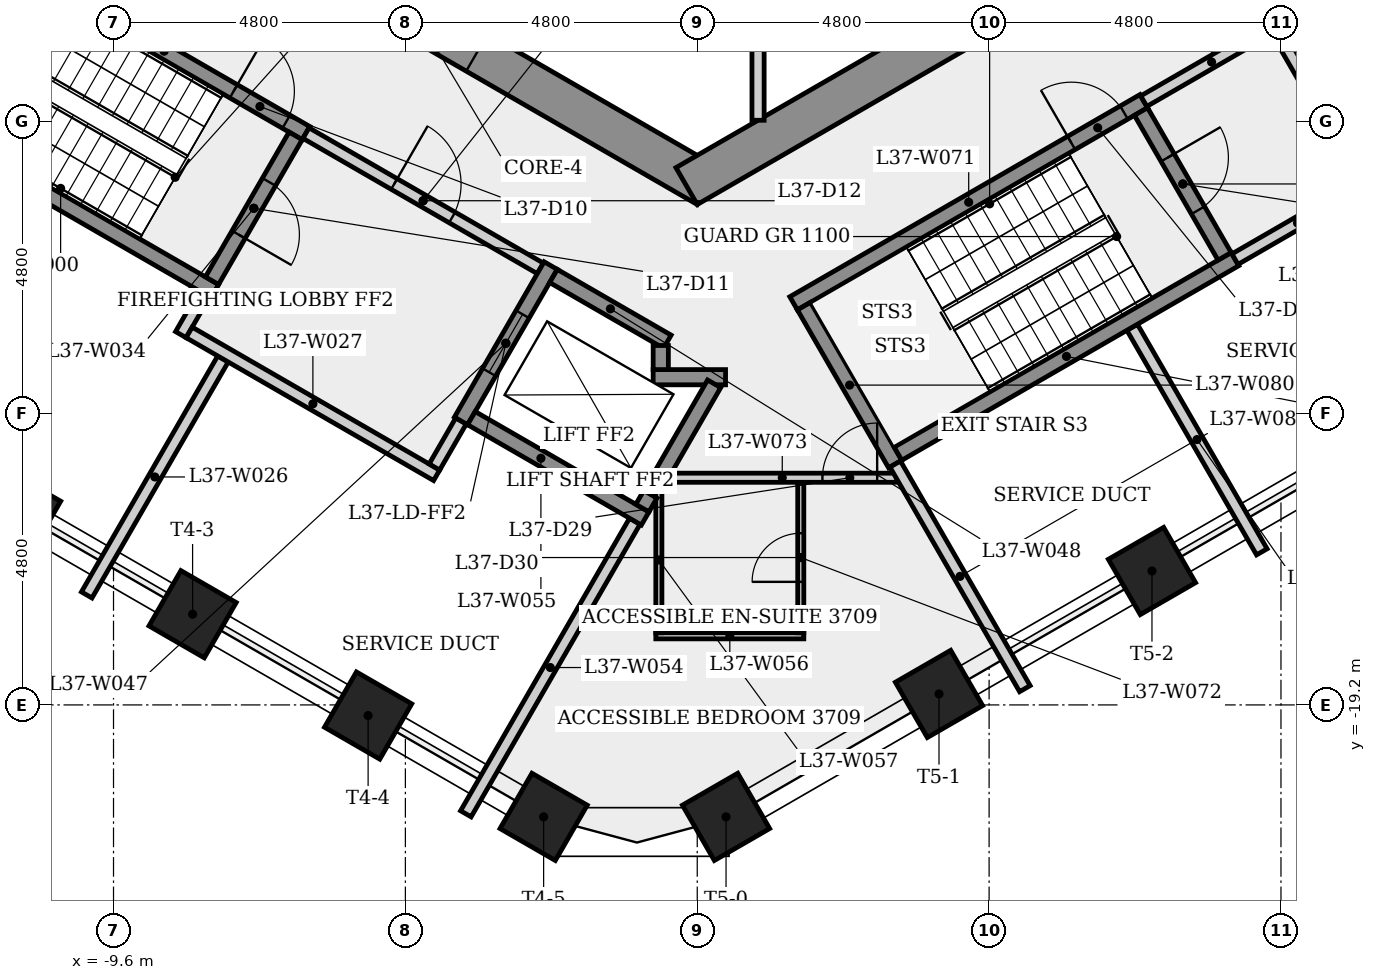
"""IFC4 building model, lengths in metres.
Left out: names, types, materials, properties, quantities, classifications, styles, units other than length and angle.
Written with IfcOpenShell. Run it as: python <this file> out.ifc"""

import sys

from ifc_helpers import new_model, si_unit, direction, frame, frame_2d, origin, origin_2d, place, context, subcontext, project, spatial, rectangle, extrude, element, fill, save


model = new_model("IFC4")
c1 = context("Model", 3, precision=1e-05, world=origin(), true_north=direction((0.0, 1.0)))
c2 = subcontext(c1, "Body", "Model", "MODEL_VIEW")
j1 = project(units=[si_unit("LENGTHUNIT", "METRE"), si_unit("PLANEANGLEUNIT", "RADIAN")], contexts=[c1])
p1 = place(None, origin())
s1 = spatial("IfcSite", under=j1, at=p1, CompositionType="ELEMENT")
p2 = place(p1, origin())
s2 = spatial("IfcBuilding", under=s1, at=p2, CompositionType="ELEMENT")
p3 = place(p2, frame((0.0, 0.0, 139.9)))
s3 = spatial("IfcBuildingStorey", under=s2, at=p3, CompositionType="ELEMENT", Elevation=139.9)
p4 = place(p3, frame((-9.325, -5.182, 0.0), z_axis=(0.0, 0.0, 1.0), x_axis=(0.866023993627, -0.500002442456, 0.0)))
e1 = element("IfcWall", 1, at=p4, inside=s3, PredefinedType="SHEAR", context=c2, shape_type="SweptSolid", body=[
    extrude(rectangle(XDim=10.97, YDim=0.7, at=frame_2d((5.485, 0.0))), origin(), (0.0, 0.0, 1.0), 4.0),
])
p5 = place(p4, frame((5.682, 0.0, 0.0)))
e2 = element("IfcOpeningElement", 2, at=p5, cuts=e1, PredefinedType="OPENING", context=c2, shape_type="SweptSolid", body=[
    extrude(rectangle(XDim=0.9, YDim=2.1, at=frame_2d((0.45, 1.05))), frame((0.0, 0.36, 0.0), z_axis=(0.0, -1.0, 0.0), x_axis=(1.0, 0.0, 0.0)), (0.0, 0.0, 1.0), 0.72),
])
p6 = place(p3, frame((-0.175, -10.667, 0.0), z_axis=(0.0, 0.0, 1.0), x_axis=(0.866023993627, 0.500002442456, 0.0)))
e3 = element("IfcWall", 3, at=p6, inside=s3, PredefinedType="SHEAR", context=c2, shape_type="SweptSolid", body=[
    extrude(rectangle(XDim=10.97, YDim=0.7, at=frame_2d((5.485, 0.0))), origin(), (0.0, 0.0, 1.0), 4.0),
])
p7 = place(p6, frame((7.252, 0.0, 0.0)))
e4 = element("IfcOpeningElement", 4, at=p7, cuts=e3, PredefinedType="OPENING", context=c2, shape_type="SweptSolid", body=[
    extrude(rectangle(XDim=0.9, YDim=2.1, at=frame_2d((0.45, 1.05))), frame((0.0, 0.36, 0.0), z_axis=(0.0, -1.0, 0.0), x_axis=(1.0, 0.0, 0.0)), (0.0, 0.0, 1.0), 0.72),
])
for number, where, z_axis, x_axis in (
    (5, (-11.186, -16.042, 0.0), (0.0, 0.0, 1.0), (-0.5, -0.866, 0.0)),
    (6, (-8.3, -17.708, 0.0), (0.0, 0.0, 1.0), (-0.5, -0.866, 0.0)),
    (7, (-5.413, -19.375, 0.0), (0.0, 0.0, 1.0), (-0.5, -0.866, 0.0)),
    (8, (-2.526, -21.042, 0.0), (0.0, 0.0, 1.0), (-0.5, -0.866, 0.0)),
    (9, (0.474, -21.042, 0.0), (0.0, 0.0, 1.0), (0.5, -0.866, 0.0)),
    (10, (3.976, -19.019, 0.0), (0.0, 0.0, 1.0), (0.5, -0.866, 0.0)),
    (11, (7.479, -16.997, 0.0), (0.0, 0.0, 1.0), (0.5, -0.866, 0.0)),
):
    element("IfcColumn", number, at=place(p3, frame(where, z_axis=z_axis, x_axis=x_axis)), inside=s3, PredefinedType="COLUMN", context=c2, shape_type="SweptSolid", body=[
        extrude(rectangle(XDim=1.05, YDim=1.05, at=origin_2d()), origin(), (0.0, 0.0, 1.0), 4.0),
    ])
p8 = place(p3, frame((-11.1, -7.101, 0.0), z_axis=(0.0, 0.0, 1.0), x_axis=(0.866028615007, -0.499994437958, 0.0)))
e12 = element("IfcWall", 12, at=p8, inside=s3, PredefinedType="SHEAR", context=c2, shape_type="SweptSolid", body=[
    extrude(rectangle(XDim=5.387, YDim=0.25, at=frame_2d((2.694, 0.0))), origin(), (0.0, 0.0, 1.0), 3.6),
])
p9 = place(p8, frame((4.012, 0.0, 0.0)))
e13 = element("IfcOpeningElement", 13, at=p9, cuts=e12, PredefinedType="OPENING", context=c2, shape_type="SweptSolid", body=[
    extrude(rectangle(XDim=1.0, YDim=2.1, at=frame_2d((0.5, 1.05))), frame((0.0, 0.135, 0.0), z_axis=(0.0, -1.0, 0.0), x_axis=(1.0, 0.0, 0.0)), (0.0, 0.0, 1.0), 0.27),
])
p10 = place(p3, frame((-8.493, -13.11, 0.0), z_axis=(0.0, 0.0, 1.0), x_axis=(0.500067724834, 0.865986299303, 0.0)))
e14 = element("IfcWall", 14, at=p10, inside=s3, PredefinedType="PLUMBINGWALL", context=c2, shape_type="SweptSolid", body=[
    extrude(rectangle(XDim=0.775, YDim=0.2, at=frame_2d((0.388, 0.0))), origin(), (0.0, 0.0, 1.0), 3.6),
])
p11 = place(p3, frame((-7.935, -12.393, 0.0), z_axis=(0.0, 0.0, 1.0), x_axis=(-0.866025499775, 0.499999833739, 0.0)))
e15 = element("IfcWall", 15, at=p11, inside=s3, PredefinedType="SHEAR", context=c2, shape_type="SweptSolid", body=[
    extrude(rectangle(XDim=6.4, YDim=0.25, at=frame_2d((3.2, 0.0))), origin(), (0.0, 0.0, 1.0), 3.6),
])
p12 = place(p3, frame((-7.8, -13.51, 0.0), z_axis=(0.0, 0.0, 1.0), x_axis=(-0.499994393058, -0.866028640929, 0.0)))
e16 = element("IfcWall", 16, at=p12, inside=s3, PredefinedType="PLUMBINGWALL", context=c2, shape_type="SweptSolid", body=[
    extrude(rectangle(XDim=4.481, YDim=0.2, at=frame_2d((2.241, 0.0))), origin(), (0.0, 0.0, 1.0), 3.6),
])
p13 = place(p3, frame((-8.356, -13.073, 0.0), z_axis=(0.0, 0.0, 1.0), x_axis=(0.866038532462, -0.499977259774, 0.0)))
e17 = element("IfcWall", 17, at=p13, inside=s3, PredefinedType="PLUMBINGWALL", context=c2, shape_type="SweptSolid", body=[
    extrude(rectangle(XDim=4.7, YDim=0.2, at=frame_2d((2.35, 0.0))), origin(), (0.0, 0.0, 1.0), 3.6),
])
p14 = place(p3, frame((-6.605, -9.841, 0.0), z_axis=(0.0, 0.0, 1.0), x_axis=(-0.499996545922, -0.866027397988, 0.0)))
e18 = element("IfcWall", 18, at=p14, inside=s3, PredefinedType="SHEAR", context=c2, shape_type="SweptSolid", body=[
    extrude(rectangle(XDim=2.75, YDim=0.25, at=frame_2d((1.375, 0.0))), origin(), (0.0, 0.0, 1.0), 3.6),
])
p15 = place(p14, frame((0.875, 0.0, 0.0)))
e19 = element("IfcOpeningElement", 19, at=p15, cuts=e18, PredefinedType="OPENING", context=c2, shape_type="SweptSolid", body=[
    extrude(rectangle(XDim=1.0, YDim=2.1, at=frame_2d((0.5, 1.05))), frame((0.0, 0.135, 0.0), z_axis=(0.0, -1.0, 0.0), x_axis=(1.0, 0.0, 0.0)), (0.0, 0.0, 1.0), 0.27),
])
p16 = place(p3, frame((-6.435, -9.795, 0.0), z_axis=(0.0, 0.0, 1.0), x_axis=(0.866012907634, -0.500021643343, 0.0)))
e20 = element("IfcWall", 20, at=p16, inside=s3, PredefinedType="PARTITIONING", context=c2, shape_type="SweptSolid", body=[
    extrude(rectangle(XDim=4.45, YDim=0.2, at=frame_2d((2.225, 0.0))), origin(), (0.0, 0.0, 1.0), 3.6),
])
p17 = place(p16, frame((1.675, 0.0, 0.0)))
e21 = element("IfcOpeningElement", 21, at=p17, cuts=e20, PredefinedType="OPENING", context=c2, shape_type="SweptSolid", body=[
    extrude(rectangle(XDim=1.1, YDim=2.1, at=frame_2d((0.55, 1.05))), frame((0.0, 0.11, 0.0), z_axis=(0.0, -1.0, 0.0), x_axis=(1.0, 0.0, 0.0)), (0.0, 0.0, 1.0), 0.22),
])
p18 = place(p3, frame((-3.885, -14.529, 0.0), z_axis=(0.0, 0.0, 1.0), x_axis=(-0.499859285417, -0.866106630146, 0.0)))
e22 = element("IfcWall", 22, at=p18, inside=s3, PredefinedType="PLUMBINGWALL", context=c2, shape_type="SweptSolid", body=[
    extrude(rectangle(XDim=0.875, YDim=0.2, at=frame_2d((0.438, 0.0))), origin(), (0.0, 0.0, 1.0), 3.6),
])
p19 = place(p3, frame((-2.41, -11.974, 0.0), z_axis=(0.0, 0.0, 1.0), x_axis=(-0.500001826776, -0.866024349092, 0.0)))
e23 = element("IfcWall", 23, at=p19, inside=s3, PredefinedType="SHEAR", context=c2, shape_type="SweptSolid", body=[
    extrude(rectangle(XDim=2.95, YDim=0.25, at=frame_2d((1.475, 0.0))), origin(), (0.0, 0.0, 1.0), 3.6),
])
p20 = place(p19, frame((0.925, 0.0, 0.0)))
e24 = element("IfcOpeningElement", 24, at=p20, cuts=e23, PredefinedType="OPENING", context=c2, shape_type="SweptSolid", body=[
    extrude(rectangle(XDim=1.1, YDim=2.1, at=frame_2d((0.55, 1.05))), frame((0.0, 0.135, 0.0), z_axis=(0.0, -1.0, 0.0), x_axis=(1.0, 0.0, 0.0)), (0.0, 0.0, 1.0), 0.27),
])
p21 = place(p3, frame((-2.364, -12.145, 0.0), z_axis=(0.0, 0.0, 1.0), x_axis=(0.86603892542, -0.499976579108, 0.0)))
e25 = element("IfcWall", 25, at=p21, inside=s3, PredefinedType="SHEAR", context=c2, shape_type="SweptSolid", body=[
    extrude(rectangle(XDim=2.162, YDim=0.25, at=frame_2d((1.081, 0.0))), origin(), (0.0, 0.0, 1.0), 3.6),
])
p22 = place(p3, frame((-1.027, -16.179, 0.0), z_axis=(0.0, 0.0, 1.0), x_axis=(-0.499995019066, -0.866028279509, 0.0)))
e26 = element("IfcWall", 26, at=p22, inside=s3, PredefinedType="PLUMBINGWALL", context=c2, shape_type="SweptSolid", body=[
    extrude(rectangle(XDim=5.557, YDim=0.2, at=frame_2d((2.778, 0.0))), origin(), (0.0, 0.0, 1.0), 3.6),
])
p23 = place(p3, frame((-0.856, -16.133, 0.0), z_axis=(0.0, 0.0, 1.0), x_axis=(-0.866021716278, 0.500006386895, 0.0)))
e27 = element("IfcWall", 27, at=p23, inside=s3, PredefinedType="SHEAR", context=c2, shape_type="SweptSolid", body=[
    extrude(rectangle(XDim=3.3, YDim=0.25, at=frame_2d((1.65, 0.0))), origin(), (0.0, 0.0, 1.0), 3.6),
])
p24 = place(p3, frame((-0.681, -18.063, 0.0), z_axis=(0.0, 0.0, 1.0), x_axis=(1.0, 0.0, 0.0)))
e28 = element("IfcWall", 28, at=p24, inside=s3, PredefinedType="PARTITIONING", context=c2, shape_type="SweptSolid", body=[
    extrude(rectangle(XDim=2.434, YDim=0.1, at=frame_2d((1.217, 0.0))), origin(), (0.0, 0.0, 1.0), 3.6),
])
p25 = place(p3, frame((-0.631, -15.618, 0.0), z_axis=(0.0, 0.0, 1.0), x_axis=(0.0, -1.0, 0.0)))
e29 = element("IfcWall", 29, at=p25, inside=s3, PredefinedType="PARTITIONING", context=c2, shape_type="SweptSolid", body=[
    extrude(rectangle(XDim=2.395, YDim=0.1, at=frame_2d((1.198, 0.0))), origin(), (0.0, 0.0, 1.0), 3.6),
])
p26 = place(p3, frame((-0.771, -15.736, 0.0), z_axis=(0.0, 0.0, 1.0), x_axis=(-0.500153222552, -0.865936922628, 0.0)))
e30 = element("IfcWall", 30, at=p26, inside=s3, PredefinedType="SHEAR", context=c2, shape_type="SweptSolid", body=[
    extrude(rectangle(XDim=0.262, YDim=0.25, at=frame_2d((0.131, 0.0))), origin(), (0.0, 0.0, 1.0), 4.0),
])
p27 = place(p3, frame((-0.725, -13.81, 0.0), z_axis=(0.0, 0.0, 1.0), x_axis=(1.0, 0.0, 0.0)))
e31 = element("IfcWall", 31, at=p27, inside=s3, PredefinedType="SHEAR", context=c2, shape_type="SweptSolid", body=[
    extrude(rectangle(XDim=1.191, YDim=0.25, at=frame_2d((0.595, 0.0))), origin(), (0.0, 0.0, 1.0), 3.6),
])
p28 = place(p3, frame((-0.6, -13.289, 0.0), z_axis=(0.0, 0.0, 1.0), x_axis=(0.0, -1.0, 0.0)))
e32 = element("IfcWall", 32, at=p28, inside=s3, PredefinedType="SHEAR", context=c2, shape_type="SweptSolid", body=[
    extrude(rectangle(XDim=0.396, YDim=0.25, at=frame_2d((0.198, 0.0))), origin(), (0.0, 0.0, 1.0), 4.0),
])
p29 = place(p3, frame((0.278, -13.918, 0.0), z_axis=(0.0, 0.0, 1.0), x_axis=(-0.499980071345, -0.866036909293, 0.0)))
e33 = element("IfcWall", 33, at=p29, inside=s3, PredefinedType="SHEAR", context=c2, shape_type="SweptSolid", body=[
    extrude(rectangle(XDim=1.859, YDim=0.25, at=frame_2d((0.93, 0.0))), origin(), (0.0, 0.0, 1.0), 4.0),
])
p30 = place(p3, frame((1.0, -5.275, 0.0), z_axis=(0.0, 0.0, 1.0), x_axis=(0.0, -1.0, 0.0)))
e34 = element("IfcWall", 34, at=p30, inside=s3, PredefinedType="PARTITIONING", context=c2, shape_type="SweptSolid", body=[
    extrude(rectangle(XDim=4.309, YDim=0.2, at=frame_2d((2.155, 0.0))), origin(), (0.0, 0.0, 1.0), 3.6),
])
p31 = place(p3, frame((1.585, -12.595, 0.0), z_axis=(0.0, 0.0, 1.0), x_axis=(0.866036417653, 0.499980922934, 0.0)))
e35 = element("IfcWall", 35, at=p31, inside=s3, PredefinedType="SHEAR", context=c2, shape_type="SweptSolid", body=[
    extrude(rectangle(XDim=6.65, YDim=0.25, at=frame_2d((3.325, 0.0))), origin(), (0.0, 0.0, 1.0), 3.6),
])
p32 = place(p31, frame((5.275, 0.0, 0.0)))
e36 = element("IfcOpeningElement", 36, at=p32, cuts=e35, PredefinedType="OPENING", context=c2, shape_type="SweptSolid", body=[
    extrude(rectangle(XDim=1.0, YDim=2.1, at=frame_2d((0.5, 1.05))), frame((0.0, 0.135, 0.0), z_axis=(0.0, -1.0, 0.0), x_axis=(1.0, 0.0, 0.0)), (0.0, 0.0, 1.0), 0.27),
])
p33 = place(p3, frame((1.703, -18.013, 0.0), z_axis=(0.0, 0.0, 1.0), x_axis=(0.0, 1.0, 0.0)))
e37 = element("IfcWall", 37, at=p33, inside=s3, PredefinedType="PARTITIONING", context=c2, shape_type="SweptSolid", body=[
    extrude(rectangle(XDim=2.475, YDim=0.1, at=frame_2d((1.237, 0.0))), origin(), (0.0, 0.0, 1.0), 3.6),
])
p34 = place(p33, frame((0.837, 0.0, 0.0)))
e38 = element("IfcOpeningElement", 38, at=p34, cuts=e37, PredefinedType="OPENING", context=c2, shape_type="SweptSolid", body=[
    extrude(rectangle(XDim=0.8, YDim=2.1, at=frame_2d((0.4, 1.05))), frame((0.0, 0.06, 0.0), z_axis=(0.0, -1.0, 0.0), x_axis=(1.0, 0.0, 0.0)), (0.0, 0.0, 1.0), 0.12),
])
p35 = place(p3, frame((-0.489, -15.463, 0.0), z_axis=(0.0, 0.0, 1.0), x_axis=(1.0, 0.0, 0.0)))
e39 = element("IfcWall", 39, at=p35, inside=s3, PredefinedType="PARTITIONING", context=c2, shape_type="SweptSolid", body=[
    extrude(rectangle(XDim=3.774, YDim=0.15, at=frame_2d((1.887, 0.0))), origin(), (0.0, 0.0, 1.0), 3.6),
])
p36 = place(p35, frame((2.548, 0.0, 0.0)))
e40 = element("IfcOpeningElement", 40, at=p36, cuts=e39, PredefinedType="OPENING", context=c2, shape_type="SweptSolid", body=[
    extrude(rectangle(XDim=0.9, YDim=2.1, at=frame_2d((0.45, 1.05))), frame((0.0, 0.085, 0.0), z_axis=(0.0, -1.0, 0.0), x_axis=(1.0, 0.0, 0.0)), (0.0, 0.0, 1.0), 0.17),
])
p37 = place(p3, frame((3.256, -15.239, 0.0), z_axis=(0.0, 0.0, 1.0), x_axis=(-0.50002537861, 0.866010750942, 0.0)))
e41 = element("IfcWall", 41, at=p37, inside=s3, PredefinedType="SHEAR", context=c2, shape_type="SweptSolid", body=[
    extrude(rectangle(XDim=3.0, YDim=0.25, at=frame_2d((1.5, 0.0))), origin(), (0.0, 0.0, 1.0), 3.6),
])
p38 = place(p3, frame((3.256, -15.239, 0.0), z_axis=(0.0, 0.0, 1.0), x_axis=(0.499986710104, -0.866033076574, 0.0)))
e42 = element("IfcWall", 42, at=p38, inside=s3, PredefinedType="PLUMBINGWALL", context=c2, shape_type="SweptSolid", body=[
    extrude(rectangle(XDim=4.265, YDim=0.2, at=frame_2d((2.133, 0.0))), origin(), (0.0, 0.0, 1.0), 3.6),
])
p39 = place(p3, frame((7.153, -12.989, 0.0), z_axis=(0.0, 0.0, 1.0), x_axis=(0.500029638619, -0.866008291244, 0.0)))
e43 = element("IfcWall", 43, at=p39, inside=s3, PredefinedType="PLUMBINGWALL", context=c2, shape_type="SweptSolid", body=[
    extrude(rectangle(XDim=4.265, YDim=0.2, at=frame_2d((2.133, 0.0))), origin(), (0.0, 0.0, 1.0), 3.6),
])
p40 = place(p3, frame((3.301, -15.068, 0.0), z_axis=(0.0, 0.0, 1.0), x_axis=(0.866035036182, 0.499983315828, 0.0)))
e44 = element("IfcWall", 44, at=p40, inside=s3, PredefinedType="SHEAR", context=c2, shape_type="SweptSolid", body=[
    extrude(rectangle(XDim=6.4, YDim=0.25, at=frame_2d((3.2, 0.0))), origin(), (0.0, 0.0, 1.0), 4.0),
])
p41 = place(p3, frame((7.298, -9.441, 0.0), z_axis=(0.0, 0.0, 1.0), x_axis=(0.500034990121, -0.866005201286, 0.0)))
e45 = element("IfcWall", 45, at=p41, inside=s3, PredefinedType="SHEAR", context=c2, shape_type="SweptSolid", body=[
    extrude(rectangle(XDim=2.75, YDim=0.25, at=frame_2d((1.375, 0.0))), origin(), (0.0, 0.0, 1.0), 3.6),
])
p42 = place(p41, frame((0.875, 0.0, 0.0)))
e46 = element("IfcOpeningElement", 46, at=p42, cuts=e45, PredefinedType="OPENING", context=c2, shape_type="SweptSolid", body=[
    extrude(rectangle(XDim=1.0, YDim=2.1, at=frame_2d((0.5, 1.05))), frame((0.0, 0.135, 0.0), z_axis=(0.0, -1.0, 0.0), x_axis=(1.0, 0.0, 0.0)), (0.0, 0.0, 1.0), 0.27),
])
p43 = place(p3, frame((7.344, -9.27, 0.0), z_axis=(0.0, 0.0, 1.0), x_axis=(0.866005588531, 0.500034319456, 0.0)))
e47 = element("IfcWall", 47, at=p43, inside=s3, PredefinedType="PARTITIONING", context=c2, shape_type="SweptSolid", body=[
    extrude(rectangle(XDim=2.575, YDim=0.2, at=frame_2d((1.288, 0.0))), origin(), (0.0, 0.0, 1.0), 3.6),
])
p44 = place(p3, frame((9.537, -8.119, 0.0), z_axis=(0.0, 0.0, 1.0), x_axis=(0.499990139034, -0.866031096941, 0.0)))
e48 = element("IfcWall", 48, at=p44, inside=s3, PredefinedType="PARTITIONING", context=c2, shape_type="SweptSolid", body=[
    extrude(rectangle(XDim=3.0, YDim=0.2, at=frame_2d((1.5, 0.0))), origin(), (0.0, 0.0, 1.0), 3.6),
])
p45 = place(p44, frame((0.935, 0.0, 0.0)))
e49 = element("IfcOpeningElement", 49, at=p45, cuts=e48, PredefinedType="OPENING", context=c2, shape_type="SweptSolid", body=[
    extrude(rectangle(XDim=1.0, YDim=2.1, at=frame_2d((0.5, 1.05))), frame((0.0, 0.11, 0.0), z_axis=(0.0, -1.0, 0.0), x_axis=(1.0, 0.0, 0.0)), (0.0, 0.0, 1.0), 0.22),
])
p46 = place(p3, frame((10.901, -10.681, 0.0), z_axis=(0.0, 0.0, 1.0), x_axis=(-0.866007538022, -0.500030943131, 0.0)))
e50 = element("IfcWall", 50, at=p46, inside=s3, PredefinedType="PLUMBINGWALL", context=c2, shape_type="SweptSolid", body=[
    extrude(rectangle(XDim=2.375, YDim=0.2, at=frame_2d((1.188, 0.0))), origin(), (0.0, 0.0, 1.0), 3.6),
])
p47 = place(p9, origin())
e51 = element("IfcDoor", 51, at=p47, inside=s3, OperationType="SINGLE_SWING_LEFT", PredefinedType="DOOR", context=c2, shape_type="SweptSolid", body=[
    extrude(rectangle(XDim=1.0, YDim=2.1, at=frame_2d((0.5, 1.05))), frame((0.0, 0.025, 0.0), z_axis=(0.0, -1.0, 0.0), x_axis=(1.0, 0.0, 0.0)), (0.0, 0.0, 1.0), 0.05),
])
fill(e13, e51)
p48 = place(p15, origin())
e52 = element("IfcDoor", 52, at=p48, inside=s3, OperationType="SINGLE_SWING_RIGHT", PredefinedType="DOOR", context=c2, shape_type="SweptSolid", body=[
    extrude(rectangle(XDim=1.0, YDim=2.1, at=frame_2d((0.5, 1.05))), frame((0.0, 0.025, 0.0), z_axis=(0.0, -1.0, 0.0), x_axis=(1.0, 0.0, 0.0)), (0.0, 0.0, 1.0), 0.05),
])
fill(e19, e52)
p49 = place(p17, origin())
e53 = element("IfcDoor", 53, at=p49, inside=s3, OperationType="SINGLE_SWING_LEFT", PredefinedType="DOOR", context=c2, shape_type="SweptSolid", body=[
    extrude(rectangle(XDim=1.1, YDim=2.1, at=frame_2d((0.55, 1.05))), frame((0.0, 0.025, 0.0), z_axis=(0.0, -1.0, 0.0), x_axis=(1.0, 0.0, 0.0)), (0.0, 0.0, 1.0), 0.05),
])
fill(e21, e53)
p50 = place(p20, origin())
e54 = element("IfcDoor", 54, at=p50, inside=s3, OperationType="SLIDING_TO_LEFT", PredefinedType="DOOR", context=c2, shape_type="SweptSolid", body=[
    extrude(rectangle(XDim=1.1, YDim=2.1, at=frame_2d((0.55, 1.05))), frame((0.0, 0.025, 0.0), z_axis=(0.0, -1.0, 0.0), x_axis=(1.0, 0.0, 0.0)), (0.0, 0.0, 1.0), 0.05),
])
fill(e24, e54)
p51 = place(p32, origin())
e55 = element("IfcDoor", 55, at=p51, inside=s3, OperationType="SINGLE_SWING_LEFT", PredefinedType="DOOR", context=c2, shape_type="SweptSolid", body=[
    extrude(rectangle(XDim=1.0, YDim=2.1, at=frame_2d((0.5, 1.05))), frame((0.0, 0.025, 0.0), z_axis=(0.0, -1.0, 0.0), x_axis=(1.0, 0.0, 0.0)), (0.0, 0.0, 1.0), 0.05),
])
fill(e36, e55)
p52 = place(p42, origin())
e56 = element("IfcDoor", 56, at=p52, inside=s3, OperationType="SINGLE_SWING_LEFT", PredefinedType="DOOR", context=c2, shape_type="SweptSolid", body=[
    extrude(rectangle(XDim=1.0, YDim=2.1, at=frame_2d((0.5, 1.05))), frame((0.0, 0.025, 0.0), z_axis=(0.0, -1.0, 0.0), x_axis=(1.0, 0.0, 0.0)), (0.0, 0.0, 1.0), 0.05),
])
fill(e46, e56)
p53 = place(p36, origin())
e57 = element("IfcDoor", 57, at=p53, inside=s3, OperationType="SINGLE_SWING_RIGHT", PredefinedType="DOOR", context=c2, shape_type="SweptSolid", body=[
    extrude(rectangle(XDim=0.9, YDim=2.1, at=frame_2d((0.45, 1.05))), frame((0.0, 0.025, 0.0), z_axis=(0.0, -1.0, 0.0), x_axis=(1.0, 0.0, 0.0)), (0.0, 0.0, 1.0), 0.05),
])
fill(e40, e57)
p54 = place(p34, origin())
e58 = element("IfcDoor", 58, at=p54, inside=s3, OperationType="SINGLE_SWING_LEFT", PredefinedType="DOOR", context=c2, shape_type="SweptSolid", body=[
    extrude(rectangle(XDim=0.8, YDim=2.1, at=frame_2d((0.4, 1.05))), frame((0.0, 0.025, 0.0), z_axis=(0.0, -1.0, 0.0), x_axis=(1.0, 0.0, 0.0)), (0.0, 0.0, 1.0), 0.05),
])
fill(e38, e58)
p55 = place(p5, origin())
e59 = element("IfcDoor", 59, at=p55, inside=s3, OperationType="SINGLE_SWING_LEFT", PredefinedType="DOOR", context=c2, shape_type="SweptSolid", body=[
    extrude(rectangle(XDim=0.9, YDim=2.1, at=frame_2d((0.45, 1.05))), frame((0.0, 0.025, 0.0), z_axis=(0.0, -1.0, 0.0), x_axis=(1.0, 0.0, 0.0)), (0.0, 0.0, 1.0), 0.05),
])
fill(e2, e59)
save(model, sys.argv[1])
